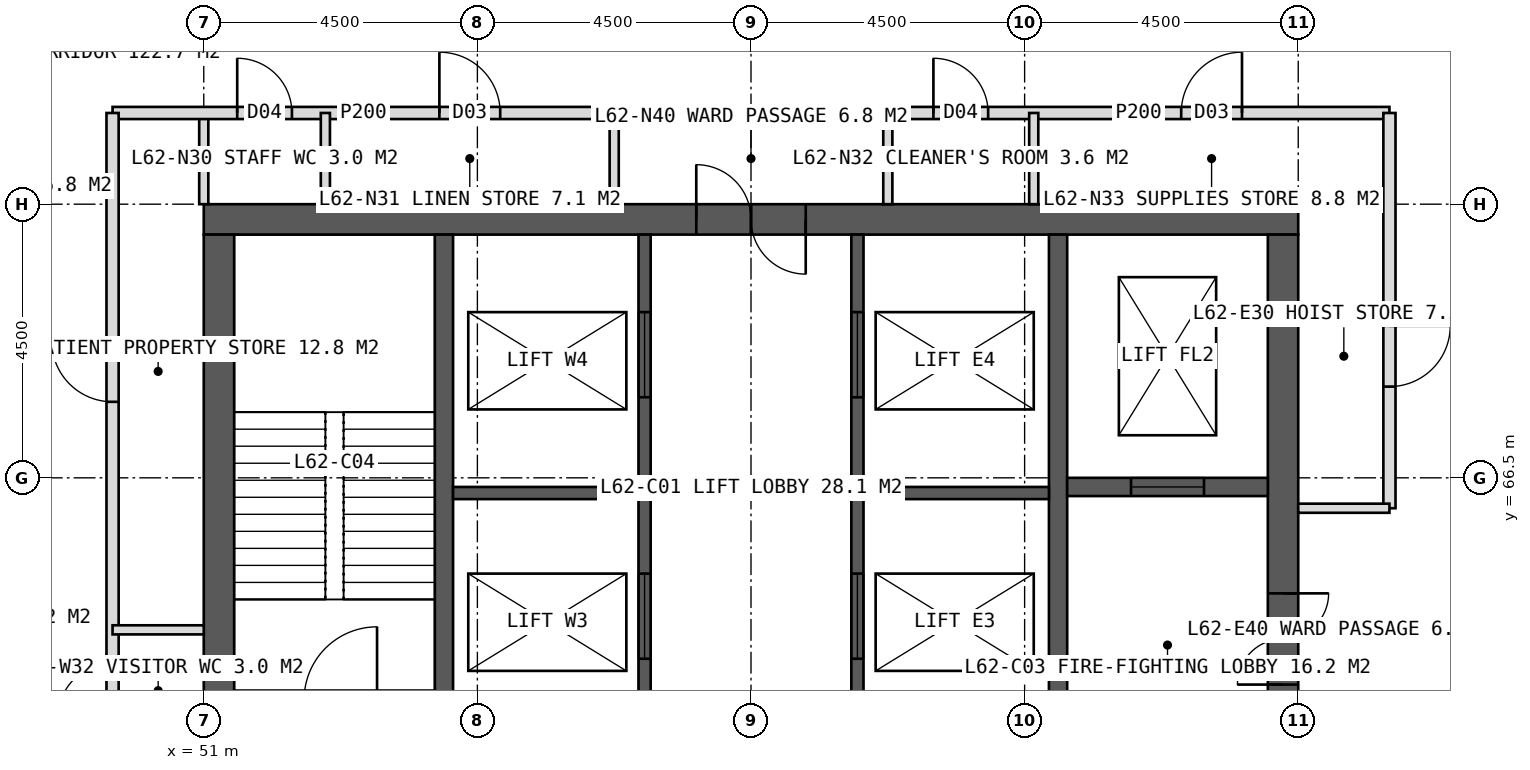
"""IFC4 building model, lengths in metres.
Left out: names, types, materials, properties, quantities, classifications, styles, units other than length and angle.
Written with IfcOpenShell. Run it as: python <this file> out.ifc"""

import sys

from ifc_helpers import new_model, si_unit, direction, frame, frame_2d, origin, place, context, subcontext, project, spatial, rectangle, extrude, element, fill, save


model = new_model("IFC4")
c1 = context("Model", 3, precision=1e-05, world=origin(), true_north=direction((0.0, 1.0)))
c2 = subcontext(c1, "Body", "Model", "MODEL_VIEW")
j1 = project(units=[si_unit("LENGTHUNIT", "METRE"), si_unit("PLANEANGLEUNIT", "RADIAN")], contexts=[c1])
p1 = place(None, origin())
s1 = spatial("IfcSite", under=j1, at=p1, CompositionType="ELEMENT")
p2 = place(p1, origin())
s2 = spatial("IfcBuilding", under=s1, at=p2, CompositionType="ELEMENT")
p3 = place(p2, frame((0.0, 0.0, 258.0)))
s3 = spatial("IfcBuildingStorey", under=s2, at=p3, CompositionType="ELEMENT", Elevation=258.0)
p4 = place(p3, frame((51.0, 70.75, 0.0), z_axis=(0.0, 0.0, 1.0), x_axis=(1.0, 0.0, 0.0)))
e1 = element("IfcWall", 1, at=p4, inside=s3, PredefinedType="SHEAR", context=c2, shape_type="SweptSolid", body=[
    extrude(rectangle(XDim=18.0, YDim=0.5, at=frame_2d((9.0, 0.0))), origin(), (0.0, 0.0, 1.0), 4.0),
])
p5 = place(p4, frame((8.1, 0.0, 0.0)))
e2 = element("IfcOpeningElement", 2, at=p5, cuts=e1, PredefinedType="OPENING", context=c2, shape_type="SweptSolid", body=[
    extrude(rectangle(XDim=1.8, YDim=2.2, at=frame_2d((0.9, 1.1))), frame((0.0, 0.26, 0.0), z_axis=(0.0, -1.0, 0.0), x_axis=(1.0, 0.0, 0.0)), (0.0, 0.0, 1.0), 0.52),
])
p6 = place(p3, frame((51.25, 53.5, 0.0), z_axis=(0.0, 0.0, 1.0), x_axis=(0.0, 1.0, 0.0)))
e3 = element("IfcWall", 3, at=p6, inside=s3, PredefinedType="SHEAR", context=c2, shape_type="SweptSolid", body=[
    extrude(rectangle(XDim=17.0, YDim=0.5, at=frame_2d((8.5, 0.0))), origin(), (0.0, 0.0, 1.0), 4.0),
])
p7 = place(p6, frame((6.1, 0.0, 0.0)))
e4 = element("IfcOpeningElement", 4, at=p7, cuts=e3, PredefinedType="OPENING", context=c2, shape_type="SweptSolid", body=[
    extrude(rectangle(XDim=1.5, YDim=2.2, at=frame_2d((0.75, 1.1))), frame((0.0, 0.26, 0.0), z_axis=(0.0, -1.0, 0.0), x_axis=(1.0, 0.0, 0.0)), (0.0, 0.0, 1.0), 0.52),
])
p8 = place(p3, frame((68.75, 53.5, 0.0), z_axis=(0.0, 0.0, 1.0), x_axis=(0.0, 1.0, 0.0)))
e5 = element("IfcWall", 5, at=p8, inside=s3, PredefinedType="SHEAR", context=c2, shape_type="SweptSolid", body=[
    extrude(rectangle(XDim=17.0, YDim=0.5, at=frame_2d((8.5, 0.0))), origin(), (0.0, 0.0, 1.0), 4.0),
])
p9 = place(p8, frame((9.6, 0.0, 0.0)))
e6 = element("IfcOpeningElement", 6, at=p9, cuts=e5, PredefinedType="OPENING", context=c2, shape_type="SweptSolid", body=[
    extrude(rectangle(XDim=1.5, YDim=2.2, at=frame_2d((0.75, 1.1))), frame((0.0, 0.26, 0.0), z_axis=(0.0, -1.0, 0.0), x_axis=(1.0, 0.0, 0.0)), (0.0, 0.0, 1.0), 0.52),
])
for number, where, z_axis, x_axis in (
    (7, (54.95, 53.5, 0.0), (0.0, 0.0, 1.0), (0.0, 1.0, 0.0)),
    (8, (65.05, 53.5, 0.0), (0.0, 0.0, 1.0), (0.0, 1.0, 0.0)),
):
    element("IfcWall", number, at=place(p3, frame(where, z_axis=z_axis, x_axis=x_axis)), inside=s3, PredefinedType="SHEAR", context=c2, shape_type="SweptSolid", body=[
        extrude(rectangle(XDim=17.0, YDim=0.3, at=frame_2d((8.5, 0.0))), origin(), (0.0, 0.0, 1.0), 4.0),
    ])
p10 = place(p3, frame((58.25, 53.5, 0.0), z_axis=(0.0, 0.0, 1.0), x_axis=(0.0, 1.0, 0.0)))
e9 = element("IfcWall", 9, at=p10, inside=s3, PredefinedType="SHEAR", context=c2, shape_type="SweptSolid", body=[
    extrude(rectangle(XDim=17.0, YDim=0.2, at=frame_2d((8.5, 0.0))), origin(), (0.0, 0.0, 1.0), 4.0),
])
p11 = place(p10, frame((0.6, 0.0, 0.0)))
e10 = element("IfcOpeningElement", 10, at=p11, cuts=e9, PredefinedType="OPENING", context=c2, shape_type="SweptSolid", body=[
    extrude(rectangle(XDim=1.0, YDim=2.1, at=frame_2d((0.5, 1.05))), frame((0.0, 0.11, 0.0), z_axis=(0.0, -1.0, 0.0), x_axis=(1.0, 0.0, 0.0)), (0.0, 0.0, 1.0), 0.22),
])
p12 = place(p10, frame((2.75, 0.0, 0.0)))
e11 = element("IfcOpeningElement", 11, at=p12, cuts=e9, PredefinedType="OPENING", context=c2, shape_type="SweptSolid", body=[
    extrude(rectangle(XDim=1.0, YDim=2.1, at=frame_2d((0.5, 1.05))), frame((0.0, 0.11, 0.0), z_axis=(0.0, -1.0, 0.0), x_axis=(1.0, 0.0, 0.0)), (0.0, 0.0, 1.0), 0.22),
])
p13 = place(p10, frame((4.824, 0.0, 0.0)))
e12 = element("IfcOpeningElement", 12, at=p13, cuts=e9, PredefinedType="OPENING", context=c2, shape_type="SweptSolid", body=[
    extrude(rectangle(XDim=1.0, YDim=2.1, at=frame_2d((0.5, 1.05))), frame((0.0, 0.11, 0.0), z_axis=(0.0, -1.0, 0.0), x_axis=(1.0, 0.0, 0.0)), (0.0, 0.0, 1.0), 0.22),
])
p14 = place(p10, frame((6.924, 0.0, 0.0)))
e13 = element("IfcOpeningElement", 13, at=p14, cuts=e9, PredefinedType="OPENING", context=c2, shape_type="SweptSolid", body=[
    extrude(rectangle(XDim=1.0, YDim=2.1, at=frame_2d((0.5, 1.05))), frame((0.0, 0.11, 0.0), z_axis=(0.0, -1.0, 0.0), x_axis=(1.0, 0.0, 0.0)), (0.0, 0.0, 1.0), 0.22),
])
p15 = place(p10, frame((10.025, 0.0, 0.0)))
e14 = element("IfcOpeningElement", 14, at=p15, cuts=e9, PredefinedType="OPENING", context=c2, shape_type="SweptSolid", body=[
    extrude(rectangle(XDim=1.4, YDim=2.2, at=frame_2d((0.7, 1.1))), frame((0.0, 0.11, 0.0), z_axis=(0.0, -1.0, 0.0), x_axis=(1.0, 0.0, 0.0)), (0.0, 0.0, 1.0), 0.22),
])
p16 = place(p10, frame((14.325, 0.0, 0.0)))
e15 = element("IfcOpeningElement", 15, at=p16, cuts=e9, PredefinedType="OPENING", context=c2, shape_type="SweptSolid", body=[
    extrude(rectangle(XDim=1.4, YDim=2.2, at=frame_2d((0.7, 1.1))), frame((0.0, 0.11, 0.0), z_axis=(0.0, -1.0, 0.0), x_axis=(1.0, 0.0, 0.0)), (0.0, 0.0, 1.0), 0.22),
])
p17 = place(p3, frame((61.75, 53.5, 0.0), z_axis=(0.0, 0.0, 1.0), x_axis=(0.0, 1.0, 0.0)))
e16 = element("IfcWall", 16, at=p17, inside=s3, PredefinedType="SHEAR", context=c2, shape_type="SweptSolid", body=[
    extrude(rectangle(XDim=17.0, YDim=0.2, at=frame_2d((8.5, 0.0))), origin(), (0.0, 0.0, 1.0), 4.0),
])
p18 = place(p17, frame((0.808, 0.0, 0.0)))
e17 = element("IfcOpeningElement", 17, at=p18, cuts=e16, PredefinedType="OPENING", context=c2, shape_type="SweptSolid", body=[
    extrude(rectangle(XDim=1.0, YDim=2.1, at=frame_2d((0.5, 1.05))), frame((0.0, 0.11, 0.0), z_axis=(0.0, -1.0, 0.0), x_axis=(1.0, 0.0, 0.0)), (0.0, 0.0, 1.0), 0.22),
])
p19 = place(p17, frame((2.958, 0.0, 0.0)))
e18 = element("IfcOpeningElement", 18, at=p19, cuts=e16, PredefinedType="OPENING", context=c2, shape_type="SweptSolid", body=[
    extrude(rectangle(XDim=1.0, YDim=2.1, at=frame_2d((0.5, 1.05))), frame((0.0, 0.11, 0.0), z_axis=(0.0, -1.0, 0.0), x_axis=(1.0, 0.0, 0.0)), (0.0, 0.0, 1.0), 0.22),
])
p20 = place(p17, frame((4.722, 0.0, 0.0)))
e19 = element("IfcOpeningElement", 19, at=p20, cuts=e16, PredefinedType="OPENING", context=c2, shape_type="SweptSolid", body=[
    extrude(rectangle(XDim=1.0, YDim=2.1, at=frame_2d((0.5, 1.05))), frame((0.0, 0.11, 0.0), z_axis=(0.0, -1.0, 0.0), x_axis=(1.0, 0.0, 0.0)), (0.0, 0.0, 1.0), 0.22),
])
p21 = place(p17, frame((6.823, 0.0, 0.0)))
e20 = element("IfcOpeningElement", 20, at=p21, cuts=e16, PredefinedType="OPENING", context=c2, shape_type="SweptSolid", body=[
    extrude(rectangle(XDim=1.0, YDim=2.1, at=frame_2d((0.5, 1.05))), frame((0.0, 0.11, 0.0), z_axis=(0.0, -1.0, 0.0), x_axis=(1.0, 0.0, 0.0)), (0.0, 0.0, 1.0), 0.22),
])
p22 = place(p17, frame((10.025, 0.0, 0.0)))
e21 = element("IfcOpeningElement", 21, at=p22, cuts=e16, PredefinedType="OPENING", context=c2, shape_type="SweptSolid", body=[
    extrude(rectangle(XDim=1.4, YDim=2.2, at=frame_2d((0.7, 1.1))), frame((0.0, 0.11, 0.0), z_axis=(0.0, -1.0, 0.0), x_axis=(1.0, 0.0, 0.0)), (0.0, 0.0, 1.0), 0.22),
])
p23 = place(p17, frame((14.325, 0.0, 0.0)))
e22 = element("IfcOpeningElement", 22, at=p23, cuts=e16, PredefinedType="OPENING", context=c2, shape_type="SweptSolid", body=[
    extrude(rectangle(XDim=1.4, YDim=2.2, at=frame_2d((0.7, 1.1))), frame((0.0, 0.11, 0.0), z_axis=(0.0, -1.0, 0.0), x_axis=(1.0, 0.0, 0.0)), (0.0, 0.0, 1.0), 0.22),
])
for number, where, z_axis, x_axis in (
    (23, (55.1, 66.25, 0.0), (0.0, 0.0, 1.0), (1.0, 0.0, 0.0)),
    (24, (61.85, 66.25, 0.0), (0.0, 0.0, 1.0), (1.0, 0.0, 0.0)),
):
    element("IfcWall", number, at=place(p3, frame(where, z_axis=z_axis, x_axis=x_axis)), inside=s3, PredefinedType="SHEAR", context=c2, shape_type="SweptSolid", body=[
        extrude(rectangle(XDim=3.05, YDim=0.2, at=frame_2d((1.525, 0.0))), origin(), (0.0, 0.0, 1.0), 4.0),
    ])
p24 = place(p3, frame((51.5, 62.85, 0.0), z_axis=(0.0, 0.0, 1.0), x_axis=(1.0, 0.0, 0.0)))
e25 = element("IfcWall", 25, at=p24, inside=s3, PredefinedType="SHEAR", context=c2, shape_type="SweptSolid", body=[
    extrude(rectangle(XDim=3.3, YDim=0.3, at=frame_2d((1.65, 0.0))), origin(), (0.0, 0.0, 1.0), 4.0),
])
p25 = place(p24, frame((1.15, 0.0, 0.0)))
e26 = element("IfcOpeningElement", 26, at=p25, cuts=e25, PredefinedType="OPENING", context=c2, shape_type="SweptSolid", body=[
    extrude(rectangle(XDim=1.2, YDim=2.1, at=frame_2d((0.6, 1.05))), frame((0.0, 0.16, 0.0), z_axis=(0.0, -1.0, 0.0), x_axis=(1.0, 0.0, 0.0)), (0.0, 0.0, 1.0), 0.32),
])
p26 = place(p3, frame((65.2, 66.35, 0.0), z_axis=(0.0, 0.0, 1.0), x_axis=(1.0, 0.0, 0.0)))
e27 = element("IfcWall", 27, at=p26, inside=s3, PredefinedType="SHEAR", context=c2, shape_type="SweptSolid", body=[
    extrude(rectangle(XDim=3.3, YDim=0.3, at=frame_2d((1.65, 0.0))), origin(), (0.0, 0.0, 1.0), 4.0),
])
p27 = place(p26, frame((1.05, 0.0, 0.0)))
e28 = element("IfcOpeningElement", 28, at=p27, cuts=e27, PredefinedType="OPENING", context=c2, shape_type="SweptSolid", body=[
    extrude(rectangle(XDim=1.2, YDim=2.2, at=frame_2d((0.6, 1.1))), frame((0.0, 0.16, 0.0), z_axis=(0.0, -1.0, 0.0), x_axis=(1.0, 0.0, 0.0)), (0.0, 0.0, 1.0), 0.32),
])
p28 = place(p3, frame((51.0, 71.0, 0.0), z_axis=(0.0, 0.0, 1.0), x_axis=(0.0, 1.0, 0.0)))
e29 = element("IfcWall", 29, at=p28, inside=s3, PredefinedType="PARTITIONING", context=c2, shape_type="SweptSolid", body=[
    extrude(rectangle(XDim=1.5, YDim=0.15, at=frame_2d((0.75, 0.0))), origin(), (0.0, 0.0, 1.0), 3.75),
])
p29 = place(p3, frame((49.5, 72.5, 0.0), z_axis=(0.0, 0.0, 1.0), x_axis=(1.0, 0.0, 0.0)))
e30 = element("IfcWall", 30, at=p29, inside=s3, PredefinedType="PARTITIONING", context=c2, shape_type="SweptSolid", body=[
    extrude(rectangle(XDim=8.25, YDim=0.2, at=frame_2d((4.125, 0.0))), origin(), (0.0, 0.0, 1.0), 3.75),
])
p30 = place(p29, frame((2.05, 0.0, 0.0)))
e31 = element("IfcOpeningElement", 31, at=p30, cuts=e30, PredefinedType="OPENING", context=c2, shape_type="SweptSolid", body=[
    extrude(rectangle(XDim=0.9, YDim=2.1, at=frame_2d((0.45, 1.05))), frame((0.0, 0.11, 0.0), z_axis=(0.0, -1.0, 0.0), x_axis=(1.0, 0.0, 0.0)), (0.0, 0.0, 1.0), 0.22),
])
p31 = place(p29, frame((5.375, 0.0, 0.0)))
e32 = element("IfcOpeningElement", 32, at=p31, cuts=e30, PredefinedType="OPENING", context=c2, shape_type="SweptSolid", body=[
    extrude(rectangle(XDim=1.0, YDim=2.1, at=frame_2d((0.5, 1.05))), frame((0.0, 0.11, 0.0), z_axis=(0.0, -1.0, 0.0), x_axis=(1.0, 0.0, 0.0)), (0.0, 0.0, 1.0), 0.22),
])
p32 = place(p3, frame((62.25, 72.5, 0.0), z_axis=(0.0, 0.0, 1.0), x_axis=(1.0, 0.0, 0.0)))
e33 = element("IfcWall", 33, at=p32, inside=s3, PredefinedType="PARTITIONING", context=c2, shape_type="SweptSolid", body=[
    extrude(rectangle(XDim=8.25, YDim=0.2, at=frame_2d((4.125, 0.0))), origin(), (0.0, 0.0, 1.0), 3.75),
])
p33 = place(p32, frame((0.75, 0.0, 0.0)))
e34 = element("IfcOpeningElement", 34, at=p33, cuts=e33, PredefinedType="OPENING", context=c2, shape_type="SweptSolid", body=[
    extrude(rectangle(XDim=0.9, YDim=2.1, at=frame_2d((0.45, 1.05))), frame((0.0, 0.11, 0.0), z_axis=(0.0, -1.0, 0.0), x_axis=(1.0, 0.0, 0.0)), (0.0, 0.0, 1.0), 0.22),
])
p34 = place(p32, frame((4.825, 0.0, 0.0)))
e35 = element("IfcOpeningElement", 35, at=p34, cuts=e33, PredefinedType="OPENING", context=c2, shape_type="SweptSolid", body=[
    extrude(rectangle(XDim=1.0, YDim=2.1, at=frame_2d((0.5, 1.05))), frame((0.0, 0.11, 0.0), z_axis=(0.0, -1.0, 0.0), x_axis=(1.0, 0.0, 0.0)), (0.0, 0.0, 1.0), 0.22),
])
for number, where, z_axis, x_axis in (
    (36, (57.75, 71.0, 0.0), (0.0, 0.0, 1.0), (0.0, 1.0, 0.0)),
    (37, (62.25, 71.0, 0.0), (0.0, 0.0, 1.0), (0.0, 1.0, 0.0)),
    (38, (53.0, 71.0, 0.0), (0.0, 0.0, 1.0), (0.0, 1.0, 0.0)),
):
    element("IfcWall", number, at=place(p3, frame(where, z_axis=z_axis, x_axis=x_axis)), inside=s3, PredefinedType="PARTITIONING", context=c2, shape_type="SweptSolid", body=[
        extrude(rectangle(XDim=1.5, YDim=0.15, at=frame_2d((0.75, 0.0))), origin(), (0.0, 0.0, 1.0), 3.75),
    ])
p35 = place(p3, frame((64.65, 71.0, 0.0), z_axis=(0.0, 0.0, 1.0), x_axis=(0.0, 1.0, 0.0)))
e39 = element("IfcWall", 39, at=p35, inside=s3, PredefinedType="PARTITIONING", context=c2, shape_type="SweptSolid", body=[
    extrude(rectangle(XDim=1.5, YDim=0.15, at=frame_2d((0.75, 0.0))), origin(), (0.0, 0.0, 1.0), 2.95),
])
p36 = place(p3, frame((49.5, 62.0, 0.0), z_axis=(0.0, 0.0, 1.0), x_axis=(0.0, 1.0, 0.0)))
e40 = element("IfcWall", 40, at=p36, inside=s3, PredefinedType="PARTITIONING", context=c2, shape_type="SweptSolid", body=[
    extrude(rectangle(XDim=10.5, YDim=0.2, at=frame_2d((5.25, 0.0))), origin(), (0.0, 0.0, 1.0), 3.75),
])
p37 = place(p36, frame((0.55, 0.0, 0.0)))
e41 = element("IfcOpeningElement", 41, at=p37, cuts=e40, PredefinedType="OPENING", context=c2, shape_type="SweptSolid", body=[
    extrude(rectangle(XDim=0.9, YDim=2.1, at=frame_2d((0.45, 1.05))), frame((0.0, 0.11, 0.0), z_axis=(0.0, -1.0, 0.0), x_axis=(1.0, 0.0, 0.0)), (0.0, 0.0, 1.0), 0.22),
])
p38 = place(p36, frame((5.75, 0.0, 0.0)))
e42 = element("IfcOpeningElement", 42, at=p38, cuts=e40, PredefinedType="OPENING", context=c2, shape_type="SweptSolid", body=[
    extrude(rectangle(XDim=1.0, YDim=2.1, at=frame_2d((0.5, 1.05))), frame((0.0, 0.11, 0.0), z_axis=(0.0, -1.0, 0.0), x_axis=(1.0, 0.0, 0.0)), (0.0, 0.0, 1.0), 0.22),
])
for number, where, z_axis, x_axis in (
    (43, (51.0, 64.0, 0.0), (0.0, 0.0, 1.0), (-1.0, 0.0, 0.0)),
    (44, (69.0, 71.0, 0.0), (0.0, 0.0, 1.0), (1.0, 0.0, 0.0)),
):
    element("IfcWall", number, at=place(p3, frame(where, z_axis=z_axis, x_axis=x_axis)), inside=s3, PredefinedType="PARTITIONING", context=c2, shape_type="SweptSolid", body=[
        extrude(rectangle(XDim=1.5, YDim=0.15, at=frame_2d((0.75, 0.0))), origin(), (0.0, 0.0, 1.0), 3.75),
    ])
p39 = place(p3, frame((70.5, 72.5, 0.0), z_axis=(0.0, 0.0, 1.0), x_axis=(0.0, -1.0, 0.0)))
e45 = element("IfcWall", 45, at=p39, inside=s3, PredefinedType="PARTITIONING", context=c2, shape_type="SweptSolid", body=[
    extrude(rectangle(XDim=6.5, YDim=0.2, at=frame_2d((3.25, 0.0))), origin(), (0.0, 0.0, 1.0), 3.75),
])
p40 = place(p39, frame((3.5, 0.0, 0.0)))
e46 = element("IfcOpeningElement", 46, at=p40, cuts=e45, PredefinedType="OPENING", context=c2, shape_type="SweptSolid", body=[
    extrude(rectangle(XDim=1.0, YDim=2.1, at=frame_2d((0.5, 1.05))), frame((0.0, 0.11, 0.0), z_axis=(0.0, -1.0, 0.0), x_axis=(1.0, 0.0, 0.0)), (0.0, 0.0, 1.0), 0.22),
])
p41 = place(p3, frame((69.0, 66.0, 0.0), z_axis=(0.0, 0.0, 1.0), x_axis=(1.0, 0.0, 0.0)))
e47 = element("IfcWall", 47, at=p41, inside=s3, PredefinedType="PARTITIONING", context=c2, shape_type="SweptSolid", body=[
    extrude(rectangle(XDim=1.5, YDim=0.15, at=frame_2d((0.75, 0.0))), origin(), (0.0, 0.0, 1.0), 3.75),
])
p42 = place(p30, origin())
e48 = element("IfcDoor", 48, at=p42, inside=s3, OperationType="SINGLE_SWING_LEFT", PredefinedType="DOOR", context=c2, shape_type="SweptSolid", body=[
    extrude(rectangle(XDim=0.9, YDim=2.1, at=frame_2d((0.45, 1.05))), frame((0.0, 0.025, 0.0), z_axis=(0.0, -1.0, 0.0), x_axis=(1.0, 0.0, 0.0)), (0.0, 0.0, 1.0), 0.05),
])
fill(e31, e48)
p43 = place(p31, origin())
e49 = element("IfcDoor", 49, at=p43, inside=s3, OperationType="SINGLE_SWING_LEFT", PredefinedType="DOOR", context=c2, shape_type="SweptSolid", body=[
    extrude(rectangle(XDim=1.0, YDim=2.1, at=frame_2d((0.5, 1.05))), frame((0.0, 0.025, 0.0), z_axis=(0.0, -1.0, 0.0), x_axis=(1.0, 0.0, 0.0)), (0.0, 0.0, 1.0), 0.05),
])
fill(e32, e49)
p44 = place(p33, origin())
e50 = element("IfcDoor", 50, at=p44, inside=s3, OperationType="SINGLE_SWING_LEFT", PredefinedType="DOOR", context=c2, shape_type="SweptSolid", body=[
    extrude(rectangle(XDim=0.9, YDim=2.1, at=frame_2d((0.45, 1.05))), frame((0.0, 0.025, 0.0), z_axis=(0.0, -1.0, 0.0), x_axis=(1.0, 0.0, 0.0)), (0.0, 0.0, 1.0), 0.05),
])
fill(e34, e50)
p45 = place(p34, origin())
e51 = element("IfcDoor", 51, at=p45, inside=s3, OperationType="SINGLE_SWING_RIGHT", PredefinedType="DOOR", context=c2, shape_type="SweptSolid", body=[
    extrude(rectangle(XDim=1.0, YDim=2.1, at=frame_2d((0.5, 1.05))), frame((0.0, 0.025, 0.0), z_axis=(0.0, -1.0, 0.0), x_axis=(1.0, 0.0, 0.0)), (0.0, 0.0, 1.0), 0.05),
])
fill(e35, e51)
p46 = place(p37, origin())
e52 = element("IfcDoor", 52, at=p46, inside=s3, OperationType="SINGLE_SWING_LEFT", PredefinedType="DOOR", context=c2, shape_type="SweptSolid", body=[
    extrude(rectangle(XDim=0.9, YDim=2.1, at=frame_2d((0.45, 1.05))), frame((0.0, 0.025, 0.0), z_axis=(0.0, -1.0, 0.0), x_axis=(1.0, 0.0, 0.0)), (0.0, 0.0, 1.0), 0.05),
])
fill(e41, e52)
p47 = place(p38, origin())
e53 = element("IfcDoor", 53, at=p47, inside=s3, OperationType="SINGLE_SWING_RIGHT", PredefinedType="DOOR", context=c2, shape_type="SweptSolid", body=[
    extrude(rectangle(XDim=1.0, YDim=2.1, at=frame_2d((0.5, 1.05))), frame((0.0, 0.025, 0.0), z_axis=(0.0, -1.0, 0.0), x_axis=(1.0, 0.0, 0.0)), (0.0, 0.0, 1.0), 0.05),
])
fill(e42, e53)
p48 = place(p40, origin())
e54 = element("IfcDoor", 54, at=p48, inside=s3, OperationType="SINGLE_SWING_LEFT", PredefinedType="DOOR", context=c2, shape_type="SweptSolid", body=[
    extrude(rectangle(XDim=1.0, YDim=2.1, at=frame_2d((0.5, 1.05))), frame((0.0, 0.025, 0.0), z_axis=(0.0, -1.0, 0.0), x_axis=(1.0, 0.0, 0.0)), (0.0, 0.0, 1.0), 0.05),
])
fill(e46, e54)
p49 = place(p5, origin())
e55 = element("IfcDoor", 55, at=p49, inside=s3, OperationType="DOUBLE_DOOR_SINGLE_SWING", PredefinedType="DOOR", context=c2, shape_type="SweptSolid", body=[
    extrude(rectangle(XDim=1.8, YDim=2.2, at=frame_2d((0.9, 1.1))), frame((0.0, 0.025, 0.0), z_axis=(0.0, -1.0, 0.0), x_axis=(1.0, 0.0, 0.0)), (0.0, 0.0, 1.0), 0.05),
])
fill(e2, e55)
p50 = place(p9, origin())
e56 = element("IfcDoor", 56, at=p50, inside=s3, OperationType="DOUBLE_DOOR_SINGLE_SWING", PredefinedType="DOOR", context=c2, shape_type="SweptSolid", body=[
    extrude(rectangle(XDim=1.5, YDim=2.2, at=frame_2d((0.75, 1.1))), frame((0.0, 0.025, 0.0), z_axis=(0.0, -1.0, 0.0), x_axis=(1.0, 0.0, 0.0)), (0.0, 0.0, 1.0), 0.05),
])
fill(e6, e56)
p51 = place(p27, origin())
e57 = element("IfcDoor", 57, at=p51, inside=s3, OperationType="SLIDING_TO_LEFT", PredefinedType="DOOR", context=c2, shape_type="SweptSolid", body=[
    extrude(rectangle(XDim=1.2, YDim=2.2, at=frame_2d((0.6, 1.1))), frame((0.0, 0.025, 0.0), z_axis=(0.0, -1.0, 0.0), x_axis=(1.0, 0.0, 0.0)), (0.0, 0.0, 1.0), 0.05),
])
fill(e28, e57)
p52 = place(p15, origin())
e58 = element("IfcDoor", 58, at=p52, inside=s3, OperationType="SLIDING_TO_LEFT", PredefinedType="DOOR", context=c2, shape_type="SweptSolid", body=[
    extrude(rectangle(XDim=1.4, YDim=2.2, at=frame_2d((0.7, 1.1))), frame((0.0, 0.025, 0.0), z_axis=(0.0, -1.0, 0.0), x_axis=(1.0, 0.0, 0.0)), (0.0, 0.0, 1.0), 0.05),
])
fill(e14, e58)
p53 = place(p22, origin())
e59 = element("IfcDoor", 59, at=p53, inside=s3, OperationType="SLIDING_TO_LEFT", PredefinedType="DOOR", context=c2, shape_type="SweptSolid", body=[
    extrude(rectangle(XDim=1.4, YDim=2.2, at=frame_2d((0.7, 1.1))), frame((0.0, 0.025, 0.0), z_axis=(0.0, -1.0, 0.0), x_axis=(1.0, 0.0, 0.0)), (0.0, 0.0, 1.0), 0.05),
])
fill(e21, e59)
p54 = place(p16, origin())
e60 = element("IfcDoor", 60, at=p54, inside=s3, OperationType="SLIDING_TO_LEFT", PredefinedType="DOOR", context=c2, shape_type="SweptSolid", body=[
    extrude(rectangle(XDim=1.4, YDim=2.2, at=frame_2d((0.7, 1.1))), frame((0.0, 0.025, 0.0), z_axis=(0.0, -1.0, 0.0), x_axis=(1.0, 0.0, 0.0)), (0.0, 0.0, 1.0), 0.05),
])
fill(e15, e60)
p55 = place(p23, origin())
e61 = element("IfcDoor", 61, at=p55, inside=s3, OperationType="SLIDING_TO_LEFT", PredefinedType="DOOR", context=c2, shape_type="SweptSolid", body=[
    extrude(rectangle(XDim=1.4, YDim=2.2, at=frame_2d((0.7, 1.1))), frame((0.0, 0.025, 0.0), z_axis=(0.0, -1.0, 0.0), x_axis=(1.0, 0.0, 0.0)), (0.0, 0.0, 1.0), 0.05),
])
fill(e22, e61)
save(model, sys.argv[1])
